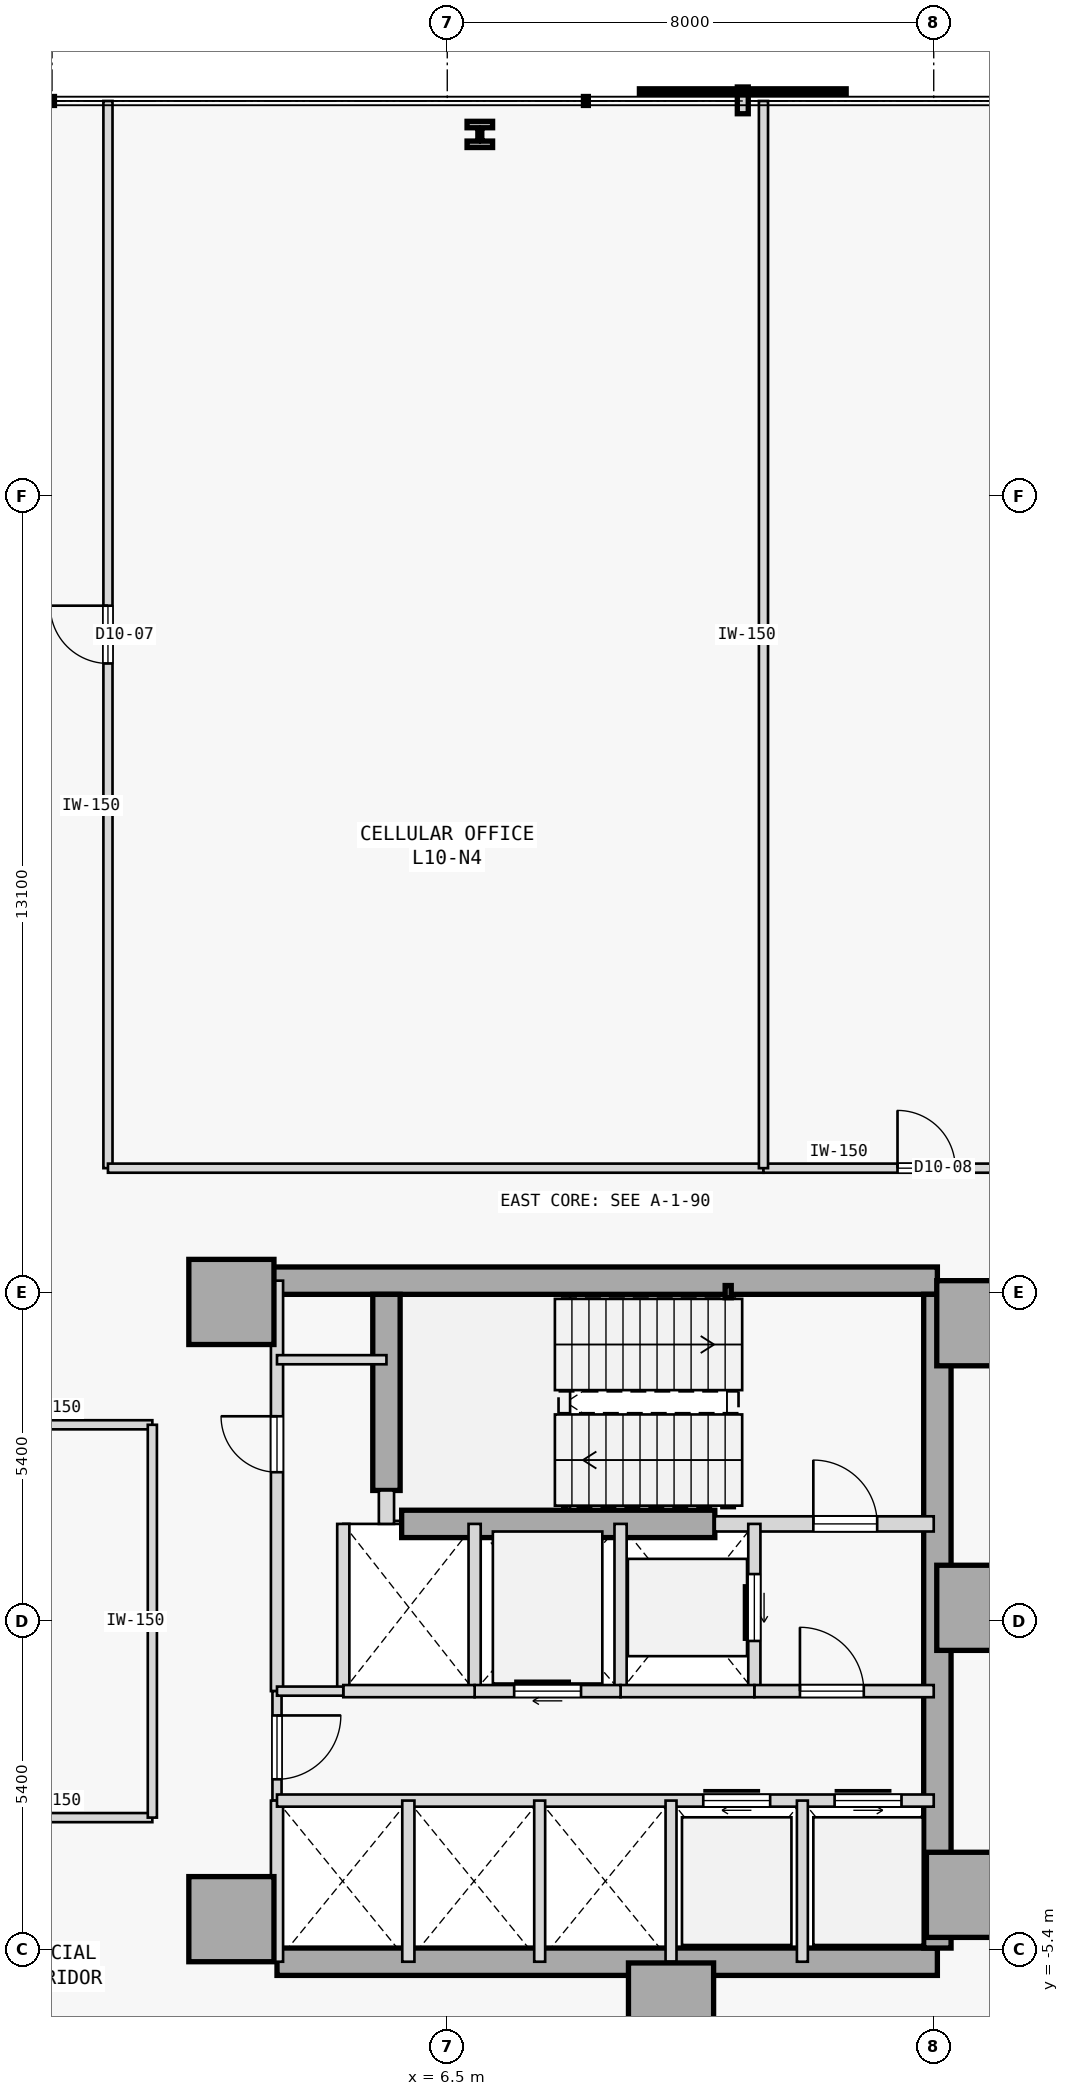
"""IFC4 building model, lengths in metres.
Left out: names, types, materials, properties, quantities, classifications, styles, units other than length and angle.
Written with IfcOpenShell. Run it as: python <this file> out.ifc"""

import sys

from ifc_helpers import new_model, si_unit, direction, frame, frame_2d, origin, origin_2d, place, context, subcontext, project, spatial, rectangle, hollow_rectangle, i_section, extrude, element, fill, save


model = new_model("IFC4")
c1 = context("Model", 3, precision=1e-05, world=origin(), true_north=direction((0.0, 1.0)))
c2 = subcontext(c1, "Body", "Model", "MODEL_VIEW")
j1 = project(units=[si_unit("LENGTHUNIT", "METRE"), si_unit("PLANEANGLEUNIT", "RADIAN")], contexts=[c1])
p1 = place(None, origin())
s1 = spatial("IfcSite", under=j1, at=p1, CompositionType="ELEMENT")
p2 = place(p1, origin())
s2 = spatial("IfcBuilding", under=s1, at=p2, CompositionType="ELEMENT")
p3 = place(p2, frame((0.0, 0.0, 44.6)))
s3 = spatial("IfcBuildingStorey", under=s2, at=p3, CompositionType="ELEMENT", Elevation=44.6)
for number, where, z_axis, x_axis in (
    (1, (15.25, 4.9, 0.0), (0.0, 0.0, 1.0), (1.0, 0.0, 0.0)),
    (2, (15.25, 0.22, 0.0), (0.0, 0.0, 1.0), (1.0, 0.0, 0.0)),
    (3, (15.08, -4.5, 0.0), (0.0, 0.0, 1.0), (1.0, 0.0, 0.0)),
    (4, (10.18, -6.32, 0.0), (0.0, 0.0, 1.0), (1.0, 0.0, 0.0)),
    (5, (2.95, -4.9, 0.0), (0.0, 0.0, 1.0), (1.0, 0.0, 0.0)),
    (6, (2.95, 5.25, 0.0), (0.0, 0.0, 1.0), (1.0, 0.0, 0.0)),
):
    element("IfcColumn", number, at=place(p3, frame(where, z_axis=z_axis, x_axis=x_axis)), inside=s3, PredefinedType="COLUMN", context=c2, shape_type="SweptSolid", body=[
        extrude(rectangle(XDim=1.4, YDim=1.4, at=origin_2d()), origin(), (0.0, 0.0, 1.0), 3.8),
    ])
p4 = place(p3, frame((3.15, 5.6, 0.0), z_axis=(0.0, 0.0, 1.0), x_axis=(1.0, 0.0, 0.0)))
e7 = element("IfcWall", 7, at=p4, inside=s3, PredefinedType="SHEAR", context=c2, shape_type="SweptSolid", body=[
    extrude(rectangle(XDim=11.41, YDim=0.45, at=frame_2d((5.705, 0.0))), origin(), (0.0, 0.0, 1.0), 3.575),
])
p5 = place(p3, frame((3.7, -5.6, 0.0), z_axis=(0.0, 0.0, 1.0), x_axis=(1.0, 0.0, 0.0)))
e8 = element("IfcWall", 8, at=p5, inside=s3, PredefinedType="SHEAR", context=c2, shape_type="SweptSolid", body=[
    extrude(rectangle(XDim=10.86, YDim=0.45, at=frame_2d((5.43, 0.0))), origin(), (0.0, 0.0, 1.0), 3.575),
])
p6 = place(p3, frame((14.56, -5.375, 0.0), z_axis=(0.0, 0.0, 1.0), x_axis=(0.0, 1.0, 0.0)))
e9 = element("IfcWall", 9, at=p6, inside=s3, PredefinedType="SHEAR", context=c2, shape_type="SweptSolid", body=[
    extrude(rectangle(XDim=10.75, YDim=0.45, at=frame_2d((5.375, 0.0))), origin(), (0.0, 0.0, 1.0), 3.575),
])
p7 = place(p3, frame((5.5, 2.15, 0.0), z_axis=(0.0, 0.0, 1.0), x_axis=(0.0, 1.0, 0.0)))
e10 = element("IfcWall", 10, at=p7, inside=s3, PredefinedType="SHEAR", context=c2, shape_type="SweptSolid", body=[
    extrude(rectangle(XDim=3.225, YDim=0.45, at=frame_2d((1.613, 0.0))), origin(), (0.0, 0.0, 1.0), 3.575),
])
p8 = place(p3, frame((5.75, 1.6, 0.0), z_axis=(0.0, 0.0, 1.0), x_axis=(1.0, 0.0, 0.0)))
e11 = element("IfcWall", 11, at=p8, inside=s3, PredefinedType="SHEAR", context=c2, shape_type="SweptSolid", body=[
    extrude(rectangle(XDim=5.15, YDim=0.45, at=frame_2d((2.575, 0.0))), origin(), (0.0, 0.0, 1.0), 3.575),
])
p9 = place(p3, frame((11.12, 5.42, 0.0), z_axis=(0.0, 0.0, 1.0), x_axis=(1.0, 0.0, 0.0)))
e12 = element("IfcColumn", 12, at=p9, inside=s3, PredefinedType="COLUMN", context=c2, shape_type="SweptSolid", body=[
    extrude(hollow_rectangle(XDim=0.1, YDim=0.2, WallThickness=0.008, at=origin_2d()), origin(), (0.0, 0.0, 1.0), 3.8),
])
p10 = place(p3, frame((7.036, 24.45, 0.0), z_axis=(0.0, 0.0, 1.0), x_axis=(1.0, 0.0, 0.0)))
e13 = element("IfcColumn", 13, at=p10, inside=s3, PredefinedType="COLUMN", context=c2, shape_type="SweptSolid", body=[
    extrude(i_section(OverallWidth=0.42, OverallDepth=0.431, WebThickness=0.065, FlangeThickness=0.106, FilletRadius=0.015, at=origin_2d()), origin(), (0.0, 0.0, 1.0), 3.8),
])
p11 = place(p3, frame((10.9, 1.6, 0.0), z_axis=(0.0, 0.0, 1.0), x_axis=(1.0, 0.0, 0.0)))
e14 = element("IfcWall", 14, at=p11, inside=s3, PredefinedType="STANDARD", context=c2, shape_type="SweptSolid", body=[
    extrude(rectangle(XDim=3.6, YDim=0.25, at=frame_2d((1.8, 0.0))), origin(), (0.0, 0.0, 1.0), 3.575),
])
p12 = place(p11, frame((1.62, 0.0, 0.0)))
e15 = element("IfcOpeningElement", 15, at=p12, cuts=e14, PredefinedType="OPENING", context=c2, shape_type="SweptSolid", body=[
    extrude(rectangle(XDim=1.05, YDim=2.15, at=frame_2d((0.525, 1.075))), frame((0.0, 0.135, 0.0), z_axis=(0.0, -1.0, 0.0), x_axis=(1.0, 0.0, 0.0)), (0.0, 0.0, 1.0), 0.27),
])
p13 = place(p3, frame((5.5, 1.6, 0.0), z_axis=(0.0, 0.0, 1.0), x_axis=(0.0, 1.0, 0.0)))
e16 = element("IfcWall", 16, at=p13, inside=s3, PredefinedType="STANDARD", context=c2, shape_type="SweptSolid", body=[
    extrude(rectangle(XDim=0.55, YDim=0.25, at=frame_2d((0.275, 0.0))), origin(), (0.0, 0.0, 1.0), 3.575),
])
p14 = place(p3, frame((3.7, -1.15, 0.0), z_axis=(0.0, 0.0, 1.0), x_axis=(0.0, 1.0, 0.0)))
e17 = element("IfcWall", 17, at=p14, inside=s3, PredefinedType="STANDARD", context=c2, shape_type="SweptSolid", body=[
    extrude(rectangle(XDim=6.75, YDim=0.2, at=frame_2d((3.375, 0.0))), origin(), (0.0, 0.0, 1.0), 3.575),
])
p15 = place(p14, frame((3.6, 0.0, 0.0)))
e18 = element("IfcOpeningElement", 18, at=p15, cuts=e17, PredefinedType="OPENING", context=c2, shape_type="SweptSolid", body=[
    extrude(rectangle(XDim=0.92, YDim=2.15, at=frame_2d((0.46, 1.075))), frame((0.0, 0.11, 0.0), z_axis=(0.0, -1.0, 0.0), x_axis=(1.0, 0.0, 0.0)), (0.0, 0.0, 1.0), 0.22),
])
p16 = place(p3, frame((3.7, -2.95, 0.0), z_axis=(0.0, 0.0, 1.0), x_axis=(0.0, 1.0, 0.0)))
e19 = element("IfcWall", 19, at=p16, inside=s3, PredefinedType="PARTITIONING", context=c2, shape_type="SweptSolid", body=[
    extrude(rectangle(XDim=1.8, YDim=0.15, at=frame_2d((0.9, 0.0))), origin(), (0.0, 0.0, 1.0), 3.575),
])
p17 = place(p16, frame((0.35, 0.0, 0.0)))
e20 = element("IfcOpeningElement", 20, at=p17, cuts=e19, PredefinedType="OPENING", context=c2, shape_type="SweptSolid", body=[
    extrude(rectangle(XDim=1.05, YDim=2.18, at=frame_2d((0.525, 1.09))), frame((0.0, 0.085, 0.0), z_axis=(0.0, -1.0, 0.0), x_axis=(1.0, 0.0, 0.0)), (0.0, 0.0, 1.0), 0.17),
])
p18 = place(p3, frame((3.7, -5.6, 0.0), z_axis=(0.0, 0.0, 1.0), x_axis=(0.0, 1.0, 0.0)))
e21 = element("IfcWall", 21, at=p18, inside=s3, PredefinedType="STANDARD", context=c2, shape_type="SweptSolid", body=[
    extrude(rectangle(XDim=2.65, YDim=0.2, at=frame_2d((1.325, 0.0))), origin(), (0.0, 0.0, 1.0), 3.575),
])
p19 = place(p3, frame((11.55, -1.15, 0.0), z_axis=(0.0, 0.0, 1.0), x_axis=(0.0, 1.0, 0.0)))
e22 = element("IfcWall", 22, at=p19, inside=s3, PredefinedType="STANDARD", context=c2, shape_type="SweptSolid", body=[
    extrude(rectangle(XDim=2.75, YDim=0.2, at=frame_2d((1.375, 0.0))), origin(), (0.0, 0.0, 1.0), 3.575),
])
p20 = place(p19, frame((0.825, 0.0, 0.0)))
e23 = element("IfcOpeningElement", 23, at=p20, cuts=e22, PredefinedType="OPENING", context=c2, shape_type="SweptSolid", body=[
    extrude(rectangle(XDim=1.1, YDim=2.15, at=frame_2d((0.55, 1.075))), frame((0.0, 0.11, 0.0), z_axis=(0.0, -1.0, 0.0), x_axis=(1.0, 0.0, 0.0)), (0.0, 0.0, 1.0), 0.22),
])
p21 = place(p3, frame((9.35, -1.15, 0.0), z_axis=(0.0, 0.0, 1.0), x_axis=(0.0, 1.0, 0.0)))
e24 = element("IfcWall", 24, at=p21, inside=s3, PredefinedType="STANDARD", context=c2, shape_type="SweptSolid", body=[
    extrude(rectangle(XDim=2.75, YDim=0.2, at=frame_2d((1.375, 0.0))), origin(), (0.0, 0.0, 1.0), 3.575),
])
p22 = place(p3, frame((11.55, -1.15, 0.0), z_axis=(0.0, 0.0, 1.0), x_axis=(1.0, 0.0, 0.0)))
e25 = element("IfcWall", 25, at=p22, inside=s3, PredefinedType="STANDARD", context=c2, shape_type="SweptSolid", body=[
    extrude(rectangle(XDim=2.95, YDim=0.2, at=frame_2d((1.475, 0.0))), origin(), (0.0, 0.0, 1.0), 3.575),
])
p23 = place(p22, frame((0.75, 0.0, 0.0)))
e26 = element("IfcOpeningElement", 26, at=p23, cuts=e25, PredefinedType="OPENING", context=c2, shape_type="SweptSolid", body=[
    extrude(rectangle(XDim=1.05, YDim=2.18, at=frame_2d((0.525, 1.09))), frame((0.0, 0.11, 0.0), z_axis=(0.0, -1.0, 0.0), x_axis=(1.0, 0.0, 0.0)), (0.0, 0.0, 1.0), 0.22),
])
p24 = place(p3, frame((9.35, -1.15, 0.0), z_axis=(0.0, 0.0, 1.0), x_axis=(1.0, 0.0, 0.0)))
e27 = element("IfcWall", 27, at=p24, inside=s3, PredefinedType="STANDARD", context=c2, shape_type="SweptSolid", body=[
    extrude(rectangle(XDim=2.2, YDim=0.2, at=frame_2d((1.1, 0.0))), origin(), (0.0, 0.0, 1.0), 3.575),
])
p25 = place(p3, frame((6.95, -1.15, 0.0), z_axis=(0.0, 0.0, 1.0), x_axis=(0.0, 1.0, 0.0)))
e28 = element("IfcWall", 28, at=p25, inside=s3, PredefinedType="STANDARD", context=c2, shape_type="SweptSolid", body=[
    extrude(rectangle(XDim=2.75, YDim=0.2, at=frame_2d((1.375, 0.0))), origin(), (0.0, 0.0, 1.0), 3.575),
])
p26 = place(p3, frame((6.95, -1.15, 0.0), z_axis=(0.0, 0.0, 1.0), x_axis=(1.0, 0.0, 0.0)))
e29 = element("IfcWall", 29, at=p26, inside=s3, PredefinedType="STANDARD", context=c2, shape_type="SweptSolid", body=[
    extrude(rectangle(XDim=2.4, YDim=0.2, at=frame_2d((1.2, 0.0))), origin(), (0.0, 0.0, 1.0), 3.575),
])
p27 = place(p26, frame((0.65, 0.0, 0.0)))
e30 = element("IfcOpeningElement", 30, at=p27, cuts=e29, PredefinedType="OPENING", context=c2, shape_type="SweptSolid", body=[
    extrude(rectangle(XDim=1.1, YDim=2.15, at=frame_2d((0.55, 1.075))), frame((0.0, 0.11, 0.0), z_axis=(0.0, -1.0, 0.0), x_axis=(1.0, 0.0, 0.0)), (0.0, 0.0, 1.0), 0.22),
])
p28 = place(p3, frame((4.79, -1.15, 0.0), z_axis=(0.0, 0.0, 1.0), x_axis=(0.0, 1.0, 0.0)))
e31 = element("IfcWall", 31, at=p28, inside=s3, PredefinedType="STANDARD", context=c2, shape_type="SweptSolid", body=[
    extrude(rectangle(XDim=2.75, YDim=0.2, at=frame_2d((1.375, 0.0))), origin(), (0.0, 0.0, 1.0), 3.575),
])
p29 = place(p3, frame((4.79, -1.15, 0.0), z_axis=(0.0, 0.0, 1.0), x_axis=(1.0, 0.0, 0.0)))
e32 = element("IfcWall", 32, at=p29, inside=s3, PredefinedType="STANDARD", context=c2, shape_type="SweptSolid", body=[
    extrude(rectangle(XDim=2.16, YDim=0.2, at=frame_2d((1.08, 0.0))), origin(), (0.0, 0.0, 1.0), 3.575),
])
p30 = place(p3, frame((3.7, -1.15, 0.0), z_axis=(0.0, 0.0, 1.0), x_axis=(1.0, 0.0, 0.0)))
e33 = element("IfcWall", 33, at=p30, inside=s3, PredefinedType="PARTITIONING", context=c2, shape_type="SweptSolid", body=[
    extrude(rectangle(XDim=1.09, YDim=0.15, at=frame_2d((0.545, 0.0))), origin(), (0.0, 0.0, 1.0), 3.575),
])
p31 = place(p3, frame((3.7, -2.95, 0.0), z_axis=(0.0, 0.0, 1.0), x_axis=(1.0, 0.0, 0.0)))
e34 = element("IfcWall", 34, at=p31, inside=s3, PredefinedType="STANDARD", context=c2, shape_type="SweptSolid", body=[
    extrude(rectangle(XDim=10.8, YDim=0.2, at=frame_2d((5.4, 0.0))), origin(), (0.0, 0.0, 1.0), 3.575),
])
p32 = place(p31, frame((7.01, 0.0, 0.0)))
e35 = element("IfcOpeningElement", 35, at=p32, cuts=e34, PredefinedType="OPENING", context=c2, shape_type="SweptSolid", body=[
    extrude(rectangle(XDim=1.1, YDim=2.15, at=frame_2d((0.55, 1.075))), frame((0.0, 0.11, 0.0), z_axis=(0.0, -1.0, 0.0), x_axis=(1.0, 0.0, 0.0)), (0.0, 0.0, 1.0), 0.22),
])
p33 = place(p31, frame((9.17, 0.0, 0.0)))
e36 = element("IfcOpeningElement", 36, at=p33, cuts=e34, PredefinedType="OPENING", context=c2, shape_type="SweptSolid", body=[
    extrude(rectangle(XDim=1.1, YDim=2.15, at=frame_2d((0.55, 1.075))), frame((0.0, 0.11, 0.0), z_axis=(0.0, -1.0, 0.0), x_axis=(1.0, 0.0, 0.0)), (0.0, 0.0, 1.0), 0.22),
])
p34 = place(p3, frame((5.86, -5.6, 0.0), z_axis=(0.0, 0.0, 1.0), x_axis=(0.0, 1.0, 0.0)))
e37 = element("IfcWall", 37, at=p34, inside=s3, PredefinedType="STANDARD", context=c2, shape_type="SweptSolid", body=[
    extrude(rectangle(XDim=2.65, YDim=0.2, at=frame_2d((1.325, 0.0))), origin(), (0.0, 0.0, 1.0), 3.575),
])
for number, where, z_axis, x_axis in (
    (38, (12.34, -5.6, 0.0), (0.0, 0.0, 1.0), (0.0, 1.0, 0.0)),
    (39, (10.18, -5.6, 0.0), (0.0, 0.0, 1.0), (0.0, 1.0, 0.0)),
    (40, (8.02, -5.6, 0.0), (0.0, 0.0, 1.0), (0.0, 1.0, 0.0)),
):
    element("IfcWall", number, at=place(p3, frame(where, z_axis=z_axis, x_axis=x_axis)), inside=s3, PredefinedType="STANDARD", context=c2, shape_type="SweptSolid", body=[
        extrude(rectangle(XDim=2.65, YDim=0.18, at=frame_2d((1.325, 0.0))), origin(), (0.0, 0.0, 1.0), 3.575),
    ])
p35 = place(p3, frame((3.7, 4.3, 0.0), z_axis=(0.0, 0.0, 1.0), x_axis=(1.0, 0.0, 0.0)))
e41 = element("IfcWall", 41, at=p35, inside=s3, PredefinedType="PARTITIONING", context=c2, shape_type="SweptSolid", body=[
    extrude(rectangle(XDim=1.8, YDim=0.15, at=frame_2d((0.9, 0.0))), origin(), (0.0, 0.0, 1.0), 3.575),
])
for number, where, z_axis, x_axis in (
    (42, (-1.65, -3.23, 0.0), (0.0, 0.0, 1.0), (1.0, 0.0, 0.0)),
    (43, (-1.65, 3.23, 0.0), (0.0, 0.0, 1.0), (1.0, 0.0, 0.0)),
):
    element("IfcWall", number, at=place(p3, frame(where, z_axis=z_axis, x_axis=x_axis)), inside=s3, PredefinedType="PARTITIONING", context=c2, shape_type="SweptSolid", body=[
        extrude(rectangle(XDim=3.3, YDim=0.15, at=frame_2d((1.65, 0.0))), origin(), (0.0, 0.0, 1.0), 3.575),
    ])
p36 = place(p3, frame((1.65, -3.23, 0.0), z_axis=(0.0, 0.0, 1.0), x_axis=(0.0, 1.0, 0.0)))
e44 = element("IfcWall", 44, at=p36, inside=s3, PredefinedType="PARTITIONING", context=c2, shape_type="SweptSolid", body=[
    extrude(rectangle(XDim=6.46, YDim=0.15, at=frame_2d((3.23, 0.0))), origin(), (0.0, 0.0, 1.0), 3.575),
])
p37 = place(p3, frame((0.92, 7.45, 0.0), z_axis=(0.0, 0.0, 1.0), x_axis=(0.0, 1.0, 0.0)))
e45 = element("IfcWall", 45, at=p37, inside=s3, PredefinedType="PARTITIONING", context=c2, shape_type="SweptSolid", body=[
    extrude(rectangle(XDim=17.55, YDim=0.15, at=frame_2d((8.775, 0.0))), origin(), (0.0, 0.0, 1.0), 3.575),
])
p38 = place(p37, frame((8.3, 0.0, 0.0)))
e46 = element("IfcOpeningElement", 46, at=p38, cuts=e45, PredefinedType="OPENING", context=c2, shape_type="SweptSolid", body=[
    extrude(rectangle(XDim=0.95, YDim=2.15, at=frame_2d((0.475, 1.075))), frame((0.0, 0.085, 0.0), z_axis=(0.0, -1.0, 0.0), x_axis=(1.0, 0.0, 0.0)), (0.0, 0.0, 1.0), 0.17),
])
p39 = place(p3, frame((0.92, 7.45, 0.0), z_axis=(0.0, 0.0, 1.0), x_axis=(1.0, 0.0, 0.0)))
e47 = element("IfcWall", 47, at=p39, inside=s3, PredefinedType="PARTITIONING", context=c2, shape_type="SweptSolid", body=[
    extrude(rectangle(XDim=10.78, YDim=0.15, at=frame_2d((5.39, 0.0))), origin(), (0.0, 0.0, 1.0), 3.575),
])
p40 = place(p3, frame((11.7, 7.45, 0.0), z_axis=(0.0, 0.0, 1.0), x_axis=(1.0, 0.0, 0.0)))
e48 = element("IfcWall", 48, at=p40, inside=s3, PredefinedType="PARTITIONING", context=c2, shape_type="SweptSolid", body=[
    extrude(rectangle(XDim=5.359, YDim=0.15, at=frame_2d((2.68, 0.0))), origin(), (0.0, 0.0, 1.0), 3.575),
])
p41 = place(p40, frame((2.205, 0.0, 0.0)))
e49 = element("IfcOpeningElement", 49, at=p41, cuts=e48, PredefinedType="OPENING", context=c2, shape_type="SweptSolid", body=[
    extrude(rectangle(XDim=0.95, YDim=2.15, at=frame_2d((0.475, 1.075))), frame((0.0, 0.085, 0.0), z_axis=(0.0, -1.0, 0.0), x_axis=(1.0, 0.0, 0.0)), (0.0, 0.0, 1.0), 0.17),
])
p42 = place(p3, frame((11.7, 7.45, 0.0), z_axis=(0.0, 0.0, 1.0), x_axis=(0.0, 1.0, 0.0)))
e50 = element("IfcWall", 50, at=p42, inside=s3, PredefinedType="PARTITIONING", context=c2, shape_type="SweptSolid", body=[
    extrude(rectangle(XDim=17.55, YDim=0.15, at=frame_2d((8.775, 0.0))), origin(), (0.0, 0.0, 1.0), 3.575),
])
p43 = place(p12, origin())
e51 = element("IfcDoor", 51, at=p43, inside=s3, OperationType="SINGLE_SWING_LEFT", PredefinedType="DOOR", context=c2, shape_type="SweptSolid", body=[
    extrude(rectangle(XDim=1.05, YDim=2.15, at=frame_2d((0.525, 1.075))), frame((0.0, 0.025, 0.0), z_axis=(0.0, -1.0, 0.0), x_axis=(1.0, 0.0, 0.0)), (0.0, 0.0, 1.0), 0.05),
])
fill(e15, e51)
p44 = place(p23, origin())
e52 = element("IfcDoor", 52, at=p44, inside=s3, OperationType="SINGLE_SWING_LEFT", PredefinedType="DOOR", context=c2, shape_type="SweptSolid", body=[
    extrude(rectangle(XDim=1.05, YDim=2.18, at=frame_2d((0.525, 1.09))), frame((0.0, 0.025, 0.0), z_axis=(0.0, -1.0, 0.0), x_axis=(1.0, 0.0, 0.0)), (0.0, 0.0, 1.0), 0.05),
])
fill(e26, e52)
p45 = place(p17, frame((1.05, 0.0, 0.0), z_axis=(0.0, 0.0, 1.0), x_axis=(-1.0, 0.0, 0.0)))
e53 = element("IfcDoor", 53, at=p45, inside=s3, OperationType="SINGLE_SWING_RIGHT", PredefinedType="DOOR", context=c2, shape_type="SweptSolid", body=[
    extrude(rectangle(XDim=1.05, YDim=2.18, at=frame_2d((0.525, 1.09))), frame((0.0, 0.025, 0.0), z_axis=(0.0, -1.0, 0.0), x_axis=(1.0, 0.0, 0.0)), (0.0, 0.0, 1.0), 0.05),
])
fill(e20, e53)
p46 = place(p20, origin())
e54 = element("IfcDoor", 54, at=p46, inside=s3, OperationType="SLIDING_TO_RIGHT", PredefinedType="DOOR", context=c2, shape_type="SweptSolid", body=[
    extrude(rectangle(XDim=1.1, YDim=2.15, at=frame_2d((0.55, 1.075))), frame((0.0, 0.025, 0.0), z_axis=(0.0, -1.0, 0.0), x_axis=(1.0, 0.0, 0.0)), (0.0, 0.0, 1.0), 0.05),
])
fill(e23, e54)
p47 = place(p27, origin())
e55 = element("IfcDoor", 55, at=p47, inside=s3, OperationType="SLIDING_TO_RIGHT", PredefinedType="DOOR", context=c2, shape_type="SweptSolid", body=[
    extrude(rectangle(XDim=1.1, YDim=2.15, at=frame_2d((0.55, 1.075))), frame((0.0, 0.025, 0.0), z_axis=(0.0, -1.0, 0.0), x_axis=(1.0, 0.0, 0.0)), (0.0, 0.0, 1.0), 0.05),
])
fill(e30, e55)
p48 = place(p32, origin())
e56 = element("IfcDoor", 56, at=p48, inside=s3, OperationType="SLIDING_TO_RIGHT", PredefinedType="DOOR", context=c2, shape_type="SweptSolid", body=[
    extrude(rectangle(XDim=1.1, YDim=2.15, at=frame_2d((0.55, 1.075))), frame((0.0, 0.025, 0.0), z_axis=(0.0, -1.0, 0.0), x_axis=(1.0, 0.0, 0.0)), (0.0, 0.0, 1.0), 0.05),
])
fill(e35, e56)
p49 = place(p33, origin())
e57 = element("IfcDoor", 57, at=p49, inside=s3, OperationType="SLIDING_TO_LEFT", PredefinedType="DOOR", context=c2, shape_type="SweptSolid", body=[
    extrude(rectangle(XDim=1.1, YDim=2.15, at=frame_2d((0.55, 1.075))), frame((0.0, 0.025, 0.0), z_axis=(0.0, -1.0, 0.0), x_axis=(1.0, 0.0, 0.0)), (0.0, 0.0, 1.0), 0.05),
])
fill(e36, e57)
p50 = place(p15, origin())
e58 = element("IfcDoor", 58, at=p50, inside=s3, OperationType="SINGLE_SWING_RIGHT", PredefinedType="DOOR", context=c2, shape_type="SweptSolid", body=[
    extrude(rectangle(XDim=0.92, YDim=2.15, at=frame_2d((0.46, 1.075))), frame((0.0, 0.025, 0.0), z_axis=(0.0, -1.0, 0.0), x_axis=(1.0, 0.0, 0.0)), (0.0, 0.0, 1.0), 0.05),
])
fill(e18, e58)
p51 = place(p38, origin())
e59 = element("IfcDoor", 59, at=p51, inside=s3, OperationType="SINGLE_SWING_RIGHT", PredefinedType="DOOR", context=c2, shape_type="SweptSolid", body=[
    extrude(rectangle(XDim=0.95, YDim=2.15, at=frame_2d((0.475, 1.075))), frame((0.0, 0.025, 0.0), z_axis=(0.0, -1.0, 0.0), x_axis=(1.0, 0.0, 0.0)), (0.0, 0.0, 1.0), 0.05),
])
fill(e46, e59)
p52 = place(p41, origin())
e60 = element("IfcDoor", 60, at=p52, inside=s3, OperationType="SINGLE_SWING_LEFT", PredefinedType="DOOR", context=c2, shape_type="SweptSolid", body=[
    extrude(rectangle(XDim=0.95, YDim=2.15, at=frame_2d((0.475, 1.075))), frame((0.0, 0.025, 0.0), z_axis=(0.0, -1.0, 0.0), x_axis=(1.0, 0.0, 0.0)), (0.0, 0.0, 1.0), 0.05),
])
fill(e49, e60)
save(model, sys.argv[1])
